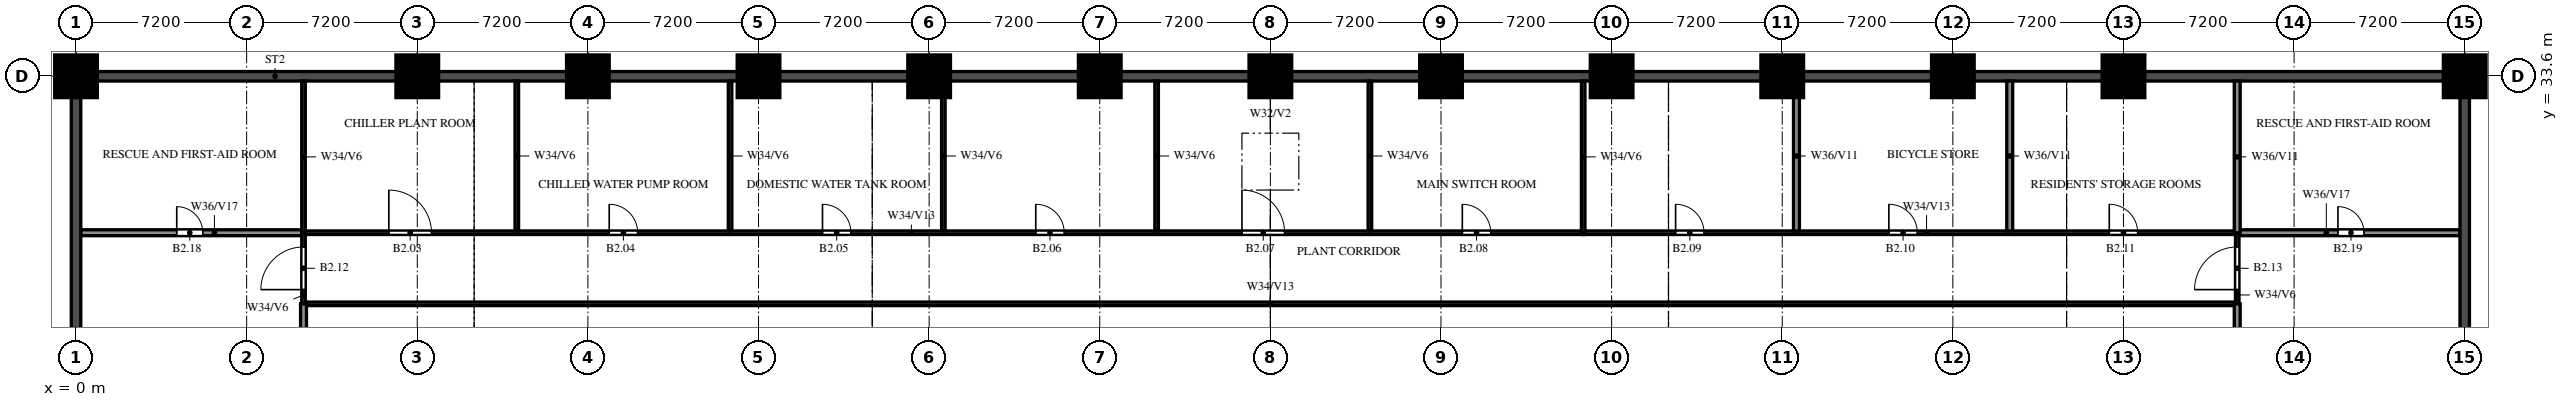
"""IFC4 building model, lengths in metres.
Left out: names, types, materials, properties, quantities, classifications, styles, units other than length and angle.
Written with IfcOpenShell. Run it as: python <this file> out.ifc"""

import sys

from ifc_helpers import new_model, si_unit, direction, frame, frame_2d, origin, origin_2d, place, context, subcontext, project, spatial, rectangle, extrude, source, transform, mapped, element, fill, save


model = new_model("IFC4")
c1 = context("Model", 3, precision=1e-05, world=origin(), true_north=direction((0.0, 1.0)))
c2 = subcontext(c1, "Body", "Model", "MODEL_VIEW")
j1 = project(units=[si_unit("LENGTHUNIT", "METRE"), si_unit("PLANEANGLEUNIT", "RADIAN")], contexts=[c1])
p1 = place(None, origin())
s1 = spatial("IfcSite", under=j1, at=p1, CompositionType="ELEMENT")
p2 = place(p1, origin())
s2 = spatial("IfcBuilding", under=s1, at=p2, CompositionType="ELEMENT")
p3 = place(p2, frame((0.0, 0.0, -11.4)))
s3 = spatial("IfcBuildingStorey", under=s2, at=p3, CompositionType="ELEMENT", Elevation=-11.4)
m1 = source(origin(), c2, "Body", "SweptSolid", [
    extrude(rectangle(XDim=1.8, YDim=1.8, at=origin_2d()), origin(), (0.0, 0.0, 1.0), 5.6),
])
for number, where, z_axis, x_axis in (
    (1, (0.0, 33.6, 0.0), (0.0, 0.0, 1.0), (1.0, 0.0, 0.0)),
    (2, (14.4, 33.6, 0.0), (0.0, 0.0, 1.0), (1.0, 0.0, 0.0)),
    (3, (21.6, 33.6, 0.0), (0.0, 0.0, 1.0), (1.0, 0.0, 0.0)),
    (4, (28.8, 33.6, 0.0), (0.0, 0.0, 1.0), (1.0, 0.0, 0.0)),
    (5, (36.0, 33.6, 0.0), (0.0, 0.0, 1.0), (1.0, 0.0, 0.0)),
    (6, (43.2, 33.6, 0.0), (0.0, 0.0, 1.0), (1.0, 0.0, 0.0)),
    (7, (50.4, 33.6, 0.0), (0.0, 0.0, 1.0), (1.0, 0.0, 0.0)),
    (8, (57.6, 33.6, 0.0), (0.0, 0.0, 1.0), (1.0, 0.0, 0.0)),
    (9, (64.8, 33.6, 0.0), (0.0, 0.0, 1.0), (1.0, 0.0, 0.0)),
    (10, (72.0, 33.6, 0.0), (0.0, 0.0, 1.0), (1.0, 0.0, 0.0)),
    (11, (79.2, 33.6, 0.0), (0.0, 0.0, 1.0), (1.0, 0.0, 0.0)),
    (12, (86.4, 33.6, 0.0), (0.0, 0.0, 1.0), (1.0, 0.0, 0.0)),
    (13, (100.8, 33.6, 0.0), (0.0, 0.0, 1.0), (1.0, 0.0, 0.0)),
):
    element("IfcColumn", number, at=place(p3, frame(where, z_axis=z_axis, x_axis=x_axis)), inside=s3, PredefinedType="COLUMN", context=c2, shape_type="MappedRepresentation", body=[
        mapped(m1, transform((0.0, 0.0, 0.0))),
    ])
p4 = place(p3, frame((9.6, 24.0, 0.0), z_axis=(0.0, 0.0, 1.0), x_axis=(1.0, 0.0, 0.0)))
e14 = element("IfcWall", 14, at=p4, inside=s3, PredefinedType="PARTITIONING", context=c2, shape_type="SweptSolid", body=[
    extrude(rectangle(XDim=81.6, YDim=0.15, at=frame_2d((40.8, 0.0))), origin(), (0.0, 0.0, 1.0), 4.4),
])
p5 = place(p3, frame((63.6, 27.0, 0.0), z_axis=(0.0, 0.0, 1.0), x_axis=(1.0, 0.0, 0.0)))
e15 = element("IfcWall", 15, at=p5, inside=s3, PredefinedType="PARTITIONING", context=c2, shape_type="SweptSolid", body=[
    extrude(rectangle(XDim=27.6, YDim=0.15, at=frame_2d((13.8, 0.0))), origin(), (0.0, 0.0, 1.0), 4.4),
])
p6 = place(p5, frame((3.9, 0.0, 0.0)))
e16 = element("IfcOpeningElement", 16, at=p6, cuts=e15, PredefinedType="OPENING", context=c2, shape_type="SweptSolid", body=[
    extrude(rectangle(XDim=1.2, YDim=2.1, at=frame_2d((0.6, 1.05))), frame((0.0, 0.085, 0.0), z_axis=(0.0, -1.0, 0.0), x_axis=(1.0, 0.0, 0.0)), (0.0, 0.0, 1.0), 0.17),
])
p7 = place(p5, frame((12.9, 0.0, 0.0)))
e17 = element("IfcOpeningElement", 17, at=p7, cuts=e15, PredefinedType="OPENING", context=c2, shape_type="SweptSolid", body=[
    extrude(rectangle(XDim=1.2, YDim=2.1, at=frame_2d((0.6, 1.05))), frame((0.0, 0.085, 0.0), z_axis=(0.0, -1.0, 0.0), x_axis=(1.0, 0.0, 0.0)), (0.0, 0.0, 1.0), 0.17),
])
p8 = place(p5, frame((22.2, 0.0, 0.0)))
e18 = element("IfcOpeningElement", 18, at=p8, cuts=e15, PredefinedType="OPENING", context=c2, shape_type="SweptSolid", body=[
    extrude(rectangle(XDim=1.2, YDim=2.1, at=frame_2d((0.6, 1.05))), frame((0.0, 0.085, 0.0), z_axis=(0.0, -1.0, 0.0), x_axis=(1.0, 0.0, 0.0)), (0.0, 0.0, 1.0), 0.17),
])
p9 = place(p3, frame((9.6, 27.0, 0.0), z_axis=(0.0, 0.0, 1.0), x_axis=(1.0, 0.0, 0.0)))
e19 = element("IfcWall", 19, at=p9, inside=s3, PredefinedType="PARTITIONING", context=c2, shape_type="SweptSolid", body=[
    extrude(rectangle(XDim=54.0, YDim=0.15, at=frame_2d((27.0, 0.0))), origin(), (0.0, 0.0, 1.0), 4.4),
])
p10 = place(p9, frame((3.6, 0.0, 0.0)))
e20 = element("IfcOpeningElement", 20, at=p10, cuts=e19, PredefinedType="OPENING", context=c2, shape_type="SweptSolid", body=[
    extrude(rectangle(XDim=1.8, YDim=2.4, at=frame_2d((0.9, 1.2))), frame((0.0, 0.085, 0.0), z_axis=(0.0, -1.0, 0.0), x_axis=(1.0, 0.0, 0.0)), (0.0, 0.0, 1.0), 0.17),
])
p11 = place(p9, frame((12.9, 0.0, 0.0)))
e21 = element("IfcOpeningElement", 21, at=p11, cuts=e19, PredefinedType="OPENING", context=c2, shape_type="SweptSolid", body=[
    extrude(rectangle(XDim=1.2, YDim=2.1, at=frame_2d((0.6, 1.05))), frame((0.0, 0.085, 0.0), z_axis=(0.0, -1.0, 0.0), x_axis=(1.0, 0.0, 0.0)), (0.0, 0.0, 1.0), 0.17),
])
p12 = place(p9, frame((21.9, 0.0, 0.0)))
e22 = element("IfcOpeningElement", 22, at=p12, cuts=e19, PredefinedType="OPENING", context=c2, shape_type="SweptSolid", body=[
    extrude(rectangle(XDim=1.2, YDim=2.1, at=frame_2d((0.6, 1.05))), frame((0.0, 0.085, 0.0), z_axis=(0.0, -1.0, 0.0), x_axis=(1.0, 0.0, 0.0)), (0.0, 0.0, 1.0), 0.17),
])
p13 = place(p9, frame((30.9, 0.0, 0.0)))
e23 = element("IfcOpeningElement", 23, at=p13, cuts=e19, PredefinedType="OPENING", context=c2, shape_type="SweptSolid", body=[
    extrude(rectangle(XDim=1.2, YDim=2.1, at=frame_2d((0.6, 1.05))), frame((0.0, 0.085, 0.0), z_axis=(0.0, -1.0, 0.0), x_axis=(1.0, 0.0, 0.0)), (0.0, 0.0, 1.0), 0.17),
])
p14 = place(p9, frame((39.6, 0.0, 0.0)))
e24 = element("IfcOpeningElement", 24, at=p14, cuts=e19, PredefinedType="OPENING", context=c2, shape_type="SweptSolid", body=[
    extrude(rectangle(XDim=1.8, YDim=2.4, at=frame_2d((0.9, 1.2))), frame((0.0, 0.085, 0.0), z_axis=(0.0, -1.0, 0.0), x_axis=(1.0, 0.0, 0.0)), (0.0, 0.0, 1.0), 0.17),
])
p15 = place(p9, frame((48.9, 0.0, 0.0)))
e25 = element("IfcOpeningElement", 25, at=p15, cuts=e19, PredefinedType="OPENING", context=c2, shape_type="SweptSolid", body=[
    extrude(rectangle(XDim=1.2, YDim=2.1, at=frame_2d((0.6, 1.05))), frame((0.0, 0.085, 0.0), z_axis=(0.0, -1.0, 0.0), x_axis=(1.0, 0.0, 0.0)), (0.0, 0.0, 1.0), 0.17),
])
p16 = place(p3, frame((0.2, 27.0, 0.0), z_axis=(0.0, 0.0, 1.0), x_axis=(1.0, 0.0, 0.0)))
e26 = element("IfcWall", 26, at=p16, inside=s3, PredefinedType="SOLIDWALL", context=c2, shape_type="SweptSolid", body=[
    extrude(rectangle(XDim=9.4, YDim=0.25, at=frame_2d((4.7, 0.0))), origin(), (0.0, 0.0, 1.0), 4.4),
])
p17 = place(p16, frame((4.05, 0.0, 0.0)))
e27 = element("IfcOpeningElement", 27, at=p17, cuts=e26, PredefinedType="OPENING", context=c2, shape_type="SweptSolid", body=[
    extrude(rectangle(XDim=1.1, YDim=2.1, at=frame_2d((0.55, 1.05))), frame((0.0, 0.135, 0.0), z_axis=(0.0, -1.0, 0.0), x_axis=(1.0, 0.0, 0.0)), (0.0, 0.0, 1.0), 0.27),
])
p18 = place(p3, frame((91.2, 27.0, 0.0), z_axis=(0.0, 0.0, 1.0), x_axis=(1.0, 0.0, 0.0)))
e28 = element("IfcWall", 28, at=p18, inside=s3, PredefinedType="SOLIDWALL", context=c2, shape_type="SweptSolid", body=[
    extrude(rectangle(XDim=9.4, YDim=0.25, at=frame_2d((4.7, 0.0))), origin(), (0.0, 0.0, 1.0), 4.4),
])
p19 = place(p18, frame((4.25, 0.0, 0.0)))
e29 = element("IfcOpeningElement", 29, at=p19, cuts=e28, PredefinedType="OPENING", context=c2, shape_type="SweptSolid", body=[
    extrude(rectangle(XDim=1.1, YDim=2.1, at=frame_2d((0.55, 1.05))), frame((0.0, 0.135, 0.0), z_axis=(0.0, -1.0, 0.0), x_axis=(1.0, 0.0, 0.0)), (0.0, 0.0, 1.0), 0.27),
])
p20 = place(p3, frame((0.0, 33.6, 0.0), z_axis=(0.0, 0.0, 1.0), x_axis=(1.0, 0.0, 0.0)))
e30 = element("IfcWall", 30, at=p20, inside=s3, PredefinedType="SOLIDWALL", context=c2, shape_type="SweptSolid", body=[
    extrude(rectangle(XDim=100.8, YDim=0.4, at=frame_2d((50.4, 0.0))), origin(), (0.0, 0.0, 1.0), 5.6),
])
p21 = place(p3, frame((0.0, 7.7, 0.0), z_axis=(0.0, 0.0, 1.0), x_axis=(0.0, 1.0, 0.0)))
e31 = element("IfcWall", 31, at=p21, inside=s3, PredefinedType="SOLIDWALL", context=c2, shape_type="SweptSolid", body=[
    extrude(rectangle(XDim=25.9, YDim=0.4, at=frame_2d((12.95, 0.0))), origin(), (0.0, 0.0, 1.0), 5.6),
])
p22 = place(p3, frame((9.6, 24.0, 0.0), z_axis=(0.0, 0.0, 1.0), x_axis=(0.0, 1.0, 0.0)))
e32 = element("IfcWall", 32, at=p22, inside=s3, PredefinedType="PARTITIONING", context=c2, shape_type="SweptSolid", body=[
    extrude(rectangle(XDim=3.0, YDim=0.15, at=frame_2d((1.5, 0.0))), origin(), (0.0, 0.0, 1.0), 5.6),
])
p23 = place(p22, frame((0.6, 0.0, 0.0)))
e33 = element("IfcOpeningElement", 33, at=p23, cuts=e32, PredefinedType="OPENING", context=c2, shape_type="SweptSolid", body=[
    extrude(rectangle(XDim=1.8, YDim=2.1, at=frame_2d((0.9, 1.05))), frame((0.0, 0.085, 0.0), z_axis=(0.0, -1.0, 0.0), x_axis=(1.0, 0.0, 0.0)), (0.0, 0.0, 1.0), 0.17),
])
p24 = place(p3, frame((9.6, 27.0, 0.0), z_axis=(0.0, 0.0, 1.0), x_axis=(0.0, 1.0, 0.0)))
e34 = element("IfcWall", 34, at=p24, inside=s3, PredefinedType="PARTITIONING", context=c2, shape_type="SweptSolid", body=[
    extrude(rectangle(XDim=6.4, YDim=0.15, at=frame_2d((3.2, 0.0))), origin(), (0.0, 0.0, 1.0), 5.6),
])
p25 = place(p3, frame((9.6, 19.2, 0.0), z_axis=(0.0, 0.0, 1.0), x_axis=(0.0, 1.0, 0.0)))
e35 = element("IfcWall", 35, at=p25, inside=s3, PredefinedType="SOLIDWALL", context=c2, shape_type="SweptSolid", body=[
    extrude(rectangle(XDim=4.8, YDim=0.25, at=frame_2d((2.4, 0.0))), origin(), (0.0, 0.0, 1.0), 2.2),
])
for number, where, z_axis, x_axis in (
    (36, (18.6, 27.075, 0.0), (0.0, 0.0, 1.0), (0.0, 1.0, 0.0)),
    (37, (27.6, 27.075, 0.0), (0.0, 0.0, 1.0), (0.0, 1.0, 0.0)),
    (38, (36.6, 27.075, 0.0), (0.0, 0.0, 1.0), (0.0, 1.0, 0.0)),
    (39, (45.6, 27.075, 0.0), (0.0, 0.0, 1.0), (0.0, 1.0, 0.0)),
    (40, (54.6, 27.075, 0.0), (0.0, 0.0, 1.0), (0.0, 1.0, 0.0)),
):
    element("IfcWall", number, at=place(p3, frame(where, z_axis=z_axis, x_axis=x_axis)), inside=s3, PredefinedType="PARTITIONING", context=c2, shape_type="SweptSolid", body=[
        extrude(rectangle(XDim=6.325, YDim=0.15, at=frame_2d((3.163, 0.0))), origin(), (0.0, 0.0, 1.0), 5.6),
    ])
p26 = place(p3, frame((63.6, 27.0, 0.0), z_axis=(0.0, 0.0, 1.0), x_axis=(0.0, 1.0, 0.0)))
e41 = element("IfcWall", 41, at=p26, inside=s3, PredefinedType="PARTITIONING", context=c2, shape_type="SweptSolid", body=[
    extrude(rectangle(XDim=6.4, YDim=0.15, at=frame_2d((3.2, 0.0))), origin(), (0.0, 0.0, 1.0), 5.6),
])
for number, where, z_axis, x_axis in (
    (42, (72.6, 27.075, 0.0), (0.0, 0.0, 1.0), (0.0, 1.0, 0.0)),
    (43, (81.6, 27.075, 0.0), (0.0, 0.0, 1.0), (0.0, 1.0, 0.0)),
):
    element("IfcWall", number, at=place(p3, frame(where, z_axis=z_axis, x_axis=x_axis)), inside=s3, PredefinedType="SOLIDWALL", context=c2, shape_type="SweptSolid", body=[
        extrude(rectangle(XDim=6.325, YDim=0.25, at=frame_2d((3.163, 0.0))), origin(), (0.0, 0.0, 1.0), 5.6),
    ])
p27 = place(p3, frame((91.2, 24.0, 0.0), z_axis=(0.0, 0.0, 1.0), x_axis=(0.0, 1.0, 0.0)))
e44 = element("IfcWall", 44, at=p27, inside=s3, PredefinedType="PARTITIONING", context=c2, shape_type="SweptSolid", body=[
    extrude(rectangle(XDim=3.0, YDim=0.15, at=frame_2d((1.5, 0.0))), origin(), (0.0, 0.0, 1.0), 5.6),
])
p28 = place(p27, frame((0.6, 0.0, 0.0)))
e45 = element("IfcOpeningElement", 45, at=p28, cuts=e44, PredefinedType="OPENING", context=c2, shape_type="SweptSolid", body=[
    extrude(rectangle(XDim=1.8, YDim=2.1, at=frame_2d((0.9, 1.05))), frame((0.0, 0.085, 0.0), z_axis=(0.0, -1.0, 0.0), x_axis=(1.0, 0.0, 0.0)), (0.0, 0.0, 1.0), 0.17),
])
p29 = place(p3, frame((91.2, 19.2, 0.0), z_axis=(0.0, 0.0, 1.0), x_axis=(0.0, 1.0, 0.0)))
e46 = element("IfcWall", 46, at=p29, inside=s3, PredefinedType="SOLIDWALL", context=c2, shape_type="SweptSolid", body=[
    extrude(rectangle(XDim=4.8, YDim=0.25, at=frame_2d((2.4, 0.0))), origin(), (0.0, 0.0, 1.0), 2.2),
])
p30 = place(p3, frame((91.2, 27.0, 0.0), z_axis=(0.0, 0.0, 1.0), x_axis=(0.0, 1.0, 0.0)))
e47 = element("IfcWall", 47, at=p30, inside=s3, PredefinedType="SOLIDWALL", context=c2, shape_type="SweptSolid", body=[
    extrude(rectangle(XDim=6.4, YDim=0.25, at=frame_2d((3.2, 0.0))), origin(), (0.0, 0.0, 1.0), 5.6),
])
p31 = place(p3, frame((100.8, 7.7, 0.0), z_axis=(0.0, 0.0, 1.0), x_axis=(0.0, 1.0, 0.0)))
e48 = element("IfcWall", 48, at=p31, inside=s3, PredefinedType="SOLIDWALL", context=c2, shape_type="SweptSolid", body=[
    extrude(rectangle(XDim=25.9, YDim=0.4, at=frame_2d((12.95, 0.0))), origin(), (0.0, 0.0, 1.0), 5.6),
])
p32 = place(p10, origin())
e49 = element("IfcDoor", 49, at=p32, inside=s3, OperationType="DOUBLE_DOOR_SINGLE_SWING", PredefinedType="DOOR", context=c2, shape_type="SweptSolid", body=[
    extrude(rectangle(XDim=1.8, YDim=2.4, at=frame_2d((0.9, 1.2))), frame((0.0, 0.025, 0.0), z_axis=(0.0, -1.0, 0.0), x_axis=(1.0, 0.0, 0.0)), (0.0, 0.0, 1.0), 0.05),
])
fill(e20, e49)
p33 = place(p11, origin())
e50 = element("IfcDoor", 50, at=p33, inside=s3, OperationType="SINGLE_SWING_LEFT", PredefinedType="DOOR", context=c2, shape_type="SweptSolid", body=[
    extrude(rectangle(XDim=1.2, YDim=2.1, at=frame_2d((0.6, 1.05))), frame((0.0, 0.025, 0.0), z_axis=(0.0, -1.0, 0.0), x_axis=(1.0, 0.0, 0.0)), (0.0, 0.0, 1.0), 0.05),
])
fill(e21, e50)
p34 = place(p12, origin())
e51 = element("IfcDoor", 51, at=p34, inside=s3, OperationType="SINGLE_SWING_LEFT", PredefinedType="DOOR", context=c2, shape_type="SweptSolid", body=[
    extrude(rectangle(XDim=1.2, YDim=2.1, at=frame_2d((0.6, 1.05))), frame((0.0, 0.025, 0.0), z_axis=(0.0, -1.0, 0.0), x_axis=(1.0, 0.0, 0.0)), (0.0, 0.0, 1.0), 0.05),
])
fill(e22, e51)
p35 = place(p13, origin())
e52 = element("IfcDoor", 52, at=p35, inside=s3, OperationType="SINGLE_SWING_RIGHT", PredefinedType="DOOR", context=c2, shape_type="SweptSolid", body=[
    extrude(rectangle(XDim=1.2, YDim=2.1, at=frame_2d((0.6, 1.05))), frame((0.0, 0.025, 0.0), z_axis=(0.0, -1.0, 0.0), x_axis=(1.0, 0.0, 0.0)), (0.0, 0.0, 1.0), 0.05),
])
fill(e23, e52)
p36 = place(p14, origin())
e53 = element("IfcDoor", 53, at=p36, inside=s3, OperationType="DOUBLE_DOOR_SINGLE_SWING", PredefinedType="DOOR", context=c2, shape_type="SweptSolid", body=[
    extrude(rectangle(XDim=1.8, YDim=2.4, at=frame_2d((0.9, 1.2))), frame((0.0, 0.025, 0.0), z_axis=(0.0, -1.0, 0.0), x_axis=(1.0, 0.0, 0.0)), (0.0, 0.0, 1.0), 0.05),
])
fill(e24, e53)
p37 = place(p15, origin())
e54 = element("IfcDoor", 54, at=p37, inside=s3, OperationType="SINGLE_SWING_RIGHT", PredefinedType="DOOR", context=c2, shape_type="SweptSolid", body=[
    extrude(rectangle(XDim=1.2, YDim=2.1, at=frame_2d((0.6, 1.05))), frame((0.0, 0.025, 0.0), z_axis=(0.0, -1.0, 0.0), x_axis=(1.0, 0.0, 0.0)), (0.0, 0.0, 1.0), 0.05),
])
fill(e25, e54)
p38 = place(p6, origin())
e55 = element("IfcDoor", 55, at=p38, inside=s3, OperationType="SINGLE_SWING_LEFT", PredefinedType="DOOR", context=c2, shape_type="SweptSolid", body=[
    extrude(rectangle(XDim=1.2, YDim=2.1, at=frame_2d((0.6, 1.05))), frame((0.0, 0.025, 0.0), z_axis=(0.0, -1.0, 0.0), x_axis=(1.0, 0.0, 0.0)), (0.0, 0.0, 1.0), 0.05),
])
fill(e16, e55)
p39 = place(p7, origin())
e56 = element("IfcDoor", 56, at=p39, inside=s3, OperationType="SINGLE_SWING_LEFT", PredefinedType="DOOR", context=c2, shape_type="SweptSolid", body=[
    extrude(rectangle(XDim=1.2, YDim=2.1, at=frame_2d((0.6, 1.05))), frame((0.0, 0.025, 0.0), z_axis=(0.0, -1.0, 0.0), x_axis=(1.0, 0.0, 0.0)), (0.0, 0.0, 1.0), 0.05),
])
fill(e17, e56)
p40 = place(p8, origin())
e57 = element("IfcDoor", 57, at=p40, inside=s3, OperationType="SINGLE_SWING_RIGHT", PredefinedType="DOOR", context=c2, shape_type="SweptSolid", body=[
    extrude(rectangle(XDim=1.2, YDim=2.1, at=frame_2d((0.6, 1.05))), frame((0.0, 0.025, 0.0), z_axis=(0.0, -1.0, 0.0), x_axis=(1.0, 0.0, 0.0)), (0.0, 0.0, 1.0), 0.05),
])
fill(e18, e57)
p41 = place(p23, origin())
e58 = element("IfcDoor", 58, at=p41, inside=s3, OperationType="DOUBLE_DOOR_SINGLE_SWING", PredefinedType="DOOR", context=c2, shape_type="SweptSolid", body=[
    extrude(rectangle(XDim=1.8, YDim=2.1, at=frame_2d((0.9, 1.05))), frame((0.0, 0.025, 0.0), z_axis=(0.0, -1.0, 0.0), x_axis=(1.0, 0.0, 0.0)), (0.0, 0.0, 1.0), 0.05),
])
fill(e33, e58)
p42 = place(p28, origin())
e59 = element("IfcDoor", 59, at=p42, inside=s3, OperationType="DOUBLE_DOOR_SINGLE_SWING", PredefinedType="DOOR", context=c2, shape_type="SweptSolid", body=[
    extrude(rectangle(XDim=1.8, YDim=2.1, at=frame_2d((0.9, 1.05))), frame((0.0, 0.025, 0.0), z_axis=(0.0, -1.0, 0.0), x_axis=(1.0, 0.0, 0.0)), (0.0, 0.0, 1.0), 0.05),
])
fill(e45, e59)
p43 = place(p17, origin())
e60 = element("IfcDoor", 60, at=p43, inside=s3, OperationType="SINGLE_SWING_LEFT", PredefinedType="DOOR", context=c2, shape_type="SweptSolid", body=[
    extrude(rectangle(XDim=1.1, YDim=2.1, at=frame_2d((0.55, 1.05))), frame((0.0, 0.025, 0.0), z_axis=(0.0, -1.0, 0.0), x_axis=(1.0, 0.0, 0.0)), (0.0, 0.0, 1.0), 0.05),
])
fill(e27, e60)
p44 = place(p19, origin())
e61 = element("IfcDoor", 61, at=p44, inside=s3, OperationType="SINGLE_SWING_RIGHT", PredefinedType="DOOR", context=c2, shape_type="SweptSolid", body=[
    extrude(rectangle(XDim=1.1, YDim=2.1, at=frame_2d((0.55, 1.05))), frame((0.0, 0.025, 0.0), z_axis=(0.0, -1.0, 0.0), x_axis=(1.0, 0.0, 0.0)), (0.0, 0.0, 1.0), 0.05),
])
fill(e29, e61)
save(model, sys.argv[1])
